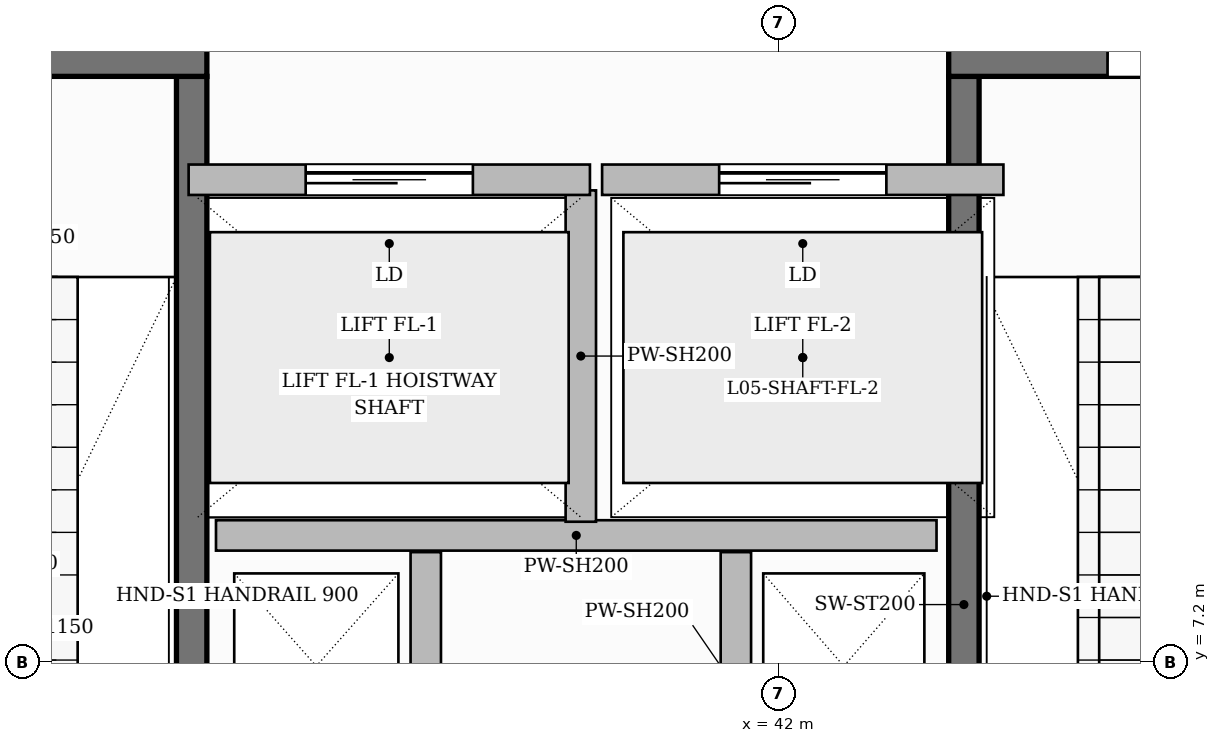
"""IFC4 building model, lengths in metres.
Left out: names, types, materials, properties, quantities, classifications, styles, units other than length and angle.
Written with IfcOpenShell. Run it as: python <this file> out.ifc"""

import sys

from ifc_helpers import new_model, si_unit, direction, frame, frame_2d, origin, place, context, subcontext, project, spatial, rectangle, extrude, source, transform, mapped, element, fill, save


model = new_model("IFC4")
c1 = context("Model", 3, precision=1e-05, world=origin(), true_north=direction((0.0, 1.0)))
c2 = subcontext(c1, "Body", "Model", "MODEL_VIEW")
j1 = project(units=[si_unit("LENGTHUNIT", "METRE"), si_unit("PLANEANGLEUNIT", "RADIAN")], contexts=[c1])
p1 = place(None, origin())
s1 = spatial("IfcSite", under=j1, at=p1, CompositionType="ELEMENT")
p2 = place(p1, origin())
s2 = spatial("IfcBuilding", under=s1, at=p2, CompositionType="ELEMENT")
p3 = place(p2, frame((0.0, 0.0, 27.0)))
s3 = spatial("IfcBuildingStorey", under=s2, at=p3, CompositionType="ELEMENT", Elevation=27.0)
p4 = place(p3, frame((38.14, 4.1, 0.0), z_axis=(0.0, 0.0, 1.0), x_axis=(0.0, 1.0, 0.0)))
e1 = element("IfcWall", 1, at=p4, inside=s3, PredefinedType="SHEAR", context=c2, shape_type="SweptSolid", body=[
    extrude(rectangle(XDim=6.95, YDim=0.2, at=frame_2d((3.475, 0.0))), origin(), (0.0, 0.0, 1.0), 5.4),
])
p5 = place(p3, frame((35.1, 11.15, 0.0), z_axis=(0.0, 0.0, 1.0), x_axis=(1.0, 0.0, 0.0)))
e2 = element("IfcWall", 2, at=p5, inside=s3, PredefinedType="SHEAR", context=c2, shape_type="SweptSolid", body=[
    extrude(rectangle(XDim=3.14, YDim=0.2, at=frame_2d((1.57, 0.0))), origin(), (0.0, 0.0, 1.0), 5.4),
])
p6 = place(p5, frame((1.045, 0.0, 0.0)))
e3 = element("IfcOpeningElement", 3, at=p6, cuts=e2, PredefinedType="OPENING", context=c2, shape_type="SweptSolid", body=[
    extrude(rectangle(XDim=1.05, YDim=2.2, at=frame_2d((0.525, 1.1))), frame((0.0, 0.11, 0.0), z_axis=(0.0, -1.0, 0.0), x_axis=(1.0, 0.0, 0.0)), (0.0, 0.0, 1.0), 0.22),
])
p7 = place(p3, frame((43.22, 4.1, 0.0), z_axis=(0.0, 0.0, 1.0), x_axis=(0.0, 1.0, 0.0)))
e4 = element("IfcWall", 4, at=p7, inside=s3, PredefinedType="SHEAR", context=c2, shape_type="SweptSolid", body=[
    extrude(rectangle(XDim=6.95, YDim=0.2, at=frame_2d((3.475, 0.0))), origin(), (0.0, 0.0, 1.0), 5.4),
])
p8 = place(p3, frame((43.12, 11.15, 0.0), z_axis=(0.0, 0.0, 1.0), x_axis=(1.0, 0.0, 0.0)))
e5 = element("IfcWall", 5, at=p8, inside=s3, PredefinedType="SHEAR", context=c2, shape_type="SweptSolid", body=[
    extrude(rectangle(XDim=6.38, YDim=0.2, at=frame_2d((3.19, 0.0))), origin(), (0.0, 0.0, 1.0), 5.4),
])
p9 = place(p8, frame((1.045, 0.0, 0.0)))
e6 = element("IfcOpeningElement", 6, at=p9, cuts=e5, PredefinedType="OPENING", context=c2, shape_type="SweptSolid", body=[
    extrude(rectangle(XDim=1.05, YDim=2.2, at=frame_2d((0.525, 1.1))), frame((0.0, 0.11, 0.0), z_axis=(0.0, -1.0, 0.0), x_axis=(1.0, 0.0, 0.0)), (0.0, 0.0, 1.0), 0.22),
])
p10 = place(p8, frame((4.125, 0.0, 0.0)))
e7 = element("IfcOpeningElement", 7, at=p10, cuts=e5, PredefinedType="OPENING", context=c2, shape_type="SweptSolid", body=[
    extrude(rectangle(XDim=1.05, YDim=2.2, at=frame_2d((0.525, 1.1))), frame((0.0, 0.11, 0.0), z_axis=(0.0, -1.0, 0.0), x_axis=(1.0, 0.0, 0.0)), (0.0, 0.0, 1.0), 0.22),
])
p11 = place(p3, frame((38.3, 8.03, 0.0), z_axis=(0.0, 0.0, 1.0), x_axis=(1.0, 0.0, 0.0)))
e8 = element("IfcWall", 8, at=p11, inside=s3, PredefinedType="PARTITIONING", context=c2, shape_type="SweptSolid", body=[
    extrude(rectangle(XDim=4.74, YDim=0.2, at=frame_2d((2.37, 0.0))), origin(), (0.0, 0.0, 1.0), 5.15),
])
p12 = place(p3, frame((40.7, 8.12, 0.0), z_axis=(0.0, 0.0, 1.0), x_axis=(0.0, 1.0, 0.0)))
e9 = element("IfcWall", 9, at=p12, inside=s3, PredefinedType="PARTITIONING", context=c2, shape_type="SweptSolid", body=[
    extrude(rectangle(XDim=2.18, YDim=0.2, at=frame_2d((1.09, 0.0))), origin(), (0.0, 0.0, 1.0), 5.15),
])
for number, where, z_axis, x_axis in (
    (10, (39.68, 6.13, 0.0), (0.0, 0.0, 1.0), (0.0, 1.0, 0.0)),
    (11, (41.72, 6.13, 0.0), (0.0, 0.0, 1.0), (0.0, 1.0, 0.0)),
):
    element("IfcWall", number, at=place(p3, frame(where, z_axis=z_axis, x_axis=x_axis)), inside=s3, PredefinedType="PARTITIONING", context=c2, shape_type="SweptSolid", body=[
        extrude(rectangle(XDim=1.79, YDim=0.2, at=frame_2d((0.895, 0.0))), origin(), (0.0, 0.0, 1.0), 5.15),
    ])
p13 = place(p3, frame((38.12, 10.37, 0.0), z_axis=(0.0, 0.0, 1.0), x_axis=(1.0, 0.0, 0.0)))
e12 = element("IfcWall", 12, at=p13, inside=s3, PredefinedType="PARTITIONING", context=c2, shape_type="SweptSolid", body=[
    extrude(rectangle(XDim=2.64, YDim=0.2, at=frame_2d((1.32, 0.0))), origin(), (0.0, 0.0, 1.0), 5.15),
])
p14 = place(p13, frame((0.77, 0.0, 0.0)))
e13 = element("IfcOpeningElement", 13, at=p14, cuts=e12, PredefinedType="OPENING", context=c2, shape_type="SweptSolid", body=[
    extrude(rectangle(XDim=1.1, YDim=2.2, at=frame_2d((0.55, 1.1))), frame((0.0, 0.11, 0.0), z_axis=(0.0, -1.0, 0.0), x_axis=(1.0, 0.0, 0.0)), (0.0, 0.0, 1.0), 0.22),
])
p15 = place(p3, frame((40.84, 10.37, 0.0), z_axis=(0.0, 0.0, 1.0), x_axis=(1.0, 0.0, 0.0)))
e14 = element("IfcWall", 14, at=p15, inside=s3, PredefinedType="PARTITIONING", context=c2, shape_type="SweptSolid", body=[
    extrude(rectangle(XDim=2.64, YDim=0.2, at=frame_2d((1.32, 0.0))), origin(), (0.0, 0.0, 1.0), 5.15),
])
p16 = place(p15, frame((0.77, 0.0, 0.0)))
e15 = element("IfcOpeningElement", 15, at=p16, cuts=e14, PredefinedType="OPENING", context=c2, shape_type="SweptSolid", body=[
    extrude(rectangle(XDim=1.1, YDim=2.2, at=frame_2d((0.55, 1.1))), frame((0.0, 0.11, 0.0), z_axis=(0.0, -1.0, 0.0), x_axis=(1.0, 0.0, 0.0)), (0.0, 0.0, 1.0), 0.22),
])
m1 = source(origin(), c2, "Body", "SweptSolid", [
    extrude(rectangle(XDim=1.05, YDim=2.2, at=frame_2d((0.525, 1.1))), frame((0.0, 0.025, 0.0), z_axis=(0.0, -1.0, 0.0), x_axis=(1.0, 0.0, 0.0)), (0.0, 0.0, 1.0), 0.05),
])
p17 = place(p9, origin())
e16 = element("IfcDoor", 16, at=p17, inside=s3, OperationType="SINGLE_SWING_RIGHT", PredefinedType="DOOR", context=c2, shape_type="MappedRepresentation", body=[
    mapped(m1, transform((0.0, 0.0, 0.0), scale=1.0)),
])
fill(e6, e16)
m2 = source(origin(), c2, "Body", "SweptSolid", [
    extrude(rectangle(XDim=1.1, YDim=2.2, at=frame_2d((0.55, 1.1))), frame((0.0, 0.025, 0.0), z_axis=(0.0, -1.0, 0.0), x_axis=(1.0, 0.0, 0.0)), (0.0, 0.0, 1.0), 0.05),
])
p18 = place(p14, origin())
e17 = element("IfcDoor", 17, at=p18, inside=s3, OperationType="SLIDING_TO_LEFT", PredefinedType="DOOR", context=c2, shape_type="MappedRepresentation", body=[
    mapped(m2, transform((0.0, 0.0, 0.0), scale=1.0)),
])
fill(e13, e17)
p19 = place(p16, origin())
e18 = element("IfcDoor", 18, at=p19, inside=s3, OperationType="SLIDING_TO_LEFT", PredefinedType="DOOR", context=c2, shape_type="MappedRepresentation", body=[
    mapped(m2, transform((0.0, 0.0, 0.0), scale=1.0)),
])
fill(e15, e18)
save(model, sys.argv[1])
